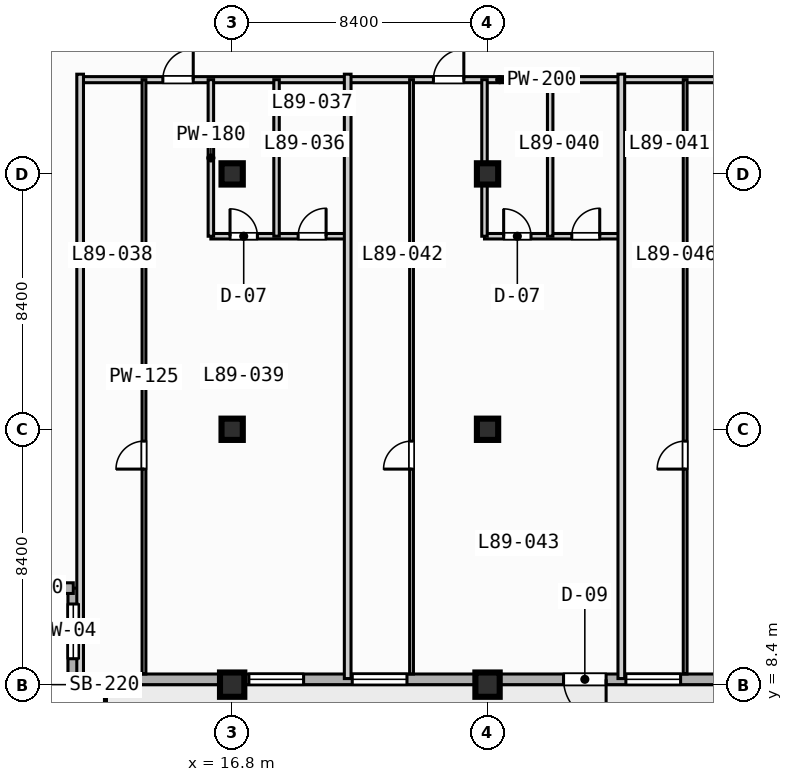
"""IFC4 building model, lengths in metres.
Left out: names, types, materials, properties, quantities, classifications, styles, units other than length and angle.
Written with IfcOpenShell. Run it as: python <this file> out.ifc"""

import sys

from ifc_helpers import new_model, si_unit, direction, frame, frame_2d, origin, origin_2d, place, context, subcontext, project, spatial, rectangle, extrude, element, fill, save


model = new_model("IFC4")
c1 = context("Model", 3, precision=1e-05, world=origin(), true_north=direction((0.0, 1.0)))
c2 = subcontext(c1, "Body", "Model", "MODEL_VIEW")
j1 = project(units=[si_unit("LENGTHUNIT", "METRE"), si_unit("PLANEANGLEUNIT", "RADIAN")], contexts=[c1])
p1 = place(None, origin())
s1 = spatial("IfcSite", under=j1, at=p1, CompositionType="ELEMENT")
p2 = place(p1, origin())
s2 = spatial("IfcBuilding", under=s1, at=p2, CompositionType="ELEMENT")
p3 = place(p2, frame((0.0, 0.0, 359.6)))
s3 = spatial("IfcBuildingStorey", under=s2, at=p3, CompositionType="ELEMENT", Elevation=359.6)
p4 = place(p3, frame((16.8, 8.4, 0.0), z_axis=(0.0, 0.0, 1.0), x_axis=(1.0, 0.0, 0.0)))
e1 = element("IfcColumn", 1, at=p4, inside=s3, PredefinedType="COLUMN", context=c2, shape_type="SweptSolid", body=[
    extrude(rectangle(XDim=0.8, YDim=0.8, at=origin_2d()), origin(), (0.0, 0.0, 1.0), 4.2),
])
for number, where, z_axis, x_axis in (
    (2, (16.8, 16.8, 0.0), (0.0, 0.0, 1.0), (1.0, 0.0, 0.0)),
    (3, (16.8, 25.2, 0.0), (0.0, 0.0, 1.0), (1.0, 0.0, 0.0)),
):
    element("IfcColumn", number, at=place(p3, frame(where, z_axis=z_axis, x_axis=x_axis)), inside=s3, PredefinedType="COLUMN", context=c2, shape_type="SweptSolid", body=[
        extrude(rectangle(XDim=0.7, YDim=0.7, at=origin_2d()), origin(), (0.0, 0.0, 1.0), 4.2),
    ])
p5 = place(p3, frame((25.2, 8.4, 0.0), z_axis=(0.0, 0.0, 1.0), x_axis=(1.0, 0.0, 0.0)))
e4 = element("IfcColumn", 4, at=p5, inside=s3, PredefinedType="COLUMN", context=c2, shape_type="SweptSolid", body=[
    extrude(rectangle(XDim=0.8, YDim=0.8, at=origin_2d()), origin(), (0.0, 0.0, 1.0), 4.2),
])
for number, where, z_axis, x_axis in (
    (5, (25.2, 16.8, 0.0), (0.0, 0.0, 1.0), (1.0, 0.0, 0.0)),
    (6, (25.2, 25.2, 0.0), (0.0, 0.0, 1.0), (1.0, 0.0, 0.0)),
):
    element("IfcColumn", number, at=place(p3, frame(where, z_axis=z_axis, x_axis=x_axis)), inside=s3, PredefinedType="COLUMN", context=c2, shape_type="SweptSolid", body=[
        extrude(rectangle(XDim=0.7, YDim=0.7, at=origin_2d()), origin(), (0.0, 0.0, 1.0), 4.2),
    ])
p6 = place(p3, frame((11.575, 8.575, 0.0), z_axis=(0.0, 0.0, 1.0), x_axis=(0.0, 1.0, 0.0)))
e7 = element("IfcWall", 7, at=p6, inside=s3, PredefinedType="STANDARD", context=c2, shape_type="SweptSolid", body=[
    extrude(rectangle(XDim=3.0, YDim=0.35, at=frame_2d((1.5, 0.0))), origin(), (0.0, 0.0, 1.0), 3.9),
])
p7 = place(p6, frame((0.677, 0.0, 0.85)))
e8 = element("IfcOpeningElement", 8, at=p7, cuts=e7, PredefinedType="OPENING", context=c2, shape_type="SweptSolid", body=[
    extrude(rectangle(XDim=1.8, YDim=1.8, at=frame_2d((0.9, 0.9))), frame((0.0, 0.185, 0.0), z_axis=(0.0, -1.0, 0.0), x_axis=(1.0, 0.0, 0.0)), (0.0, 0.0, 1.0), 0.37),
])
p8 = place(p3, frame((11.575, 11.575, 0.0), z_axis=(0.0, 0.0, 1.0), x_axis=(-1.0, 0.0, 0.0)))
e9 = element("IfcWall", 9, at=p8, inside=s3, PredefinedType="STANDARD", context=c2, shape_type="SweptSolid", body=[
    extrude(rectangle(XDim=3.0, YDim=0.35, at=frame_2d((1.5, 0.0))), origin(), (0.0, 0.0, 1.0), 3.9),
])
p9 = place(p3, frame((64.025, 8.575, 0.0), z_axis=(0.0, 0.0, 1.0), x_axis=(-1.0, 0.0, 0.0)))
e10 = element("IfcWall", 10, at=p9, inside=s3, PredefinedType="STANDARD", context=c2, shape_type="SweptSolid", body=[
    extrude(rectangle(XDim=52.45, YDim=0.35, at=frame_2d((26.225, 0.0))), origin(), (0.0, 0.0, 1.0), 3.045),
])
p10 = place(p9, frame((34.925, 0.0, 0.0)))
e11 = element("IfcOpeningElement", 11, at=p10, cuts=e10, PredefinedType="OPENING", context=c2, shape_type="SweptSolid", body=[
    extrude(rectangle(XDim=1.4, YDim=2.2, at=frame_2d((0.7, 1.1))), frame((0.0, 0.185, 0.0), z_axis=(0.0, -1.0, 0.0), x_axis=(1.0, 0.0, 0.0)), (0.0, 0.0, 1.0), 0.37),
])
p11 = place(p9, frame((24.825, 0.0, 0.45)))
e12 = element("IfcOpeningElement", 12, at=p11, cuts=e10, PredefinedType="OPENING", context=c2, shape_type="SweptSolid", body=[
    extrude(rectangle(XDim=2.8, YDim=2.1, at=frame_2d((1.4, 1.05))), frame((0.0, 0.185, 0.0), z_axis=(0.0, -1.0, 0.0), x_axis=(1.0, 0.0, 0.0)), (0.0, 0.0, 1.0), 0.37),
])
p12 = place(p9, frame((16.425, 0.0, 0.45)))
e13 = element("IfcOpeningElement", 13, at=p12, cuts=e10, PredefinedType="OPENING", context=c2, shape_type="SweptSolid", body=[
    extrude(rectangle(XDim=2.8, YDim=2.1, at=frame_2d((1.4, 1.05))), frame((0.0, 0.185, 0.0), z_axis=(0.0, -1.0, 0.0), x_axis=(1.0, 0.0, 0.0)), (0.0, 0.0, 1.0), 0.37),
])
p13 = place(p9, frame((50.275, 0.0, 0.85)))
e14 = element("IfcOpeningElement", 14, at=p13, cuts=e10, PredefinedType="OPENING", context=c2, shape_type="SweptSolid", body=[
    extrude(rectangle(XDim=1.8, YDim=1.8, at=frame_2d((0.9, 0.9))), frame((0.0, 0.185, 0.0), z_axis=(0.0, -1.0, 0.0), x_axis=(1.0, 0.0, 0.0)), (0.0, 0.0, 1.0), 0.37),
])
p14 = place(p9, frame((44.875, 0.0, 0.85)))
e15 = element("IfcOpeningElement", 15, at=p14, cuts=e10, PredefinedType="OPENING", context=c2, shape_type="SweptSolid", body=[
    extrude(rectangle(XDim=1.8, YDim=1.8, at=frame_2d((0.9, 0.9))), frame((0.0, 0.185, 0.0), z_axis=(0.0, -1.0, 0.0), x_axis=(1.0, 0.0, 0.0)), (0.0, 0.0, 1.0), 0.37),
])
p15 = place(p9, frame((41.475, 0.0, 0.85)))
e16 = element("IfcOpeningElement", 16, at=p15, cuts=e10, PredefinedType="OPENING", context=c2, shape_type="SweptSolid", body=[
    extrude(rectangle(XDim=1.8, YDim=1.8, at=frame_2d((0.9, 0.9))), frame((0.0, 0.185, 0.0), z_axis=(0.0, -1.0, 0.0), x_axis=(1.0, 0.0, 0.0)), (0.0, 0.0, 1.0), 0.37),
])
p16 = place(p9, frame((32.475, 0.0, 0.85)))
e17 = element("IfcOpeningElement", 17, at=p16, cuts=e10, PredefinedType="OPENING", context=c2, shape_type="SweptSolid", body=[
    extrude(rectangle(XDim=1.8, YDim=1.8, at=frame_2d((0.9, 0.9))), frame((0.0, 0.185, 0.0), z_axis=(0.0, -1.0, 0.0), x_axis=(1.0, 0.0, 0.0)), (0.0, 0.0, 1.0), 0.37),
])
p17 = place(p3, frame((11.8, 28.3, 0.0), z_axis=(0.0, 0.0, 1.0), x_axis=(1.0, 0.0, 0.0)))
e18 = element("IfcWall", 18, at=p17, inside=s3, PredefinedType="PARTITIONING", context=c2, shape_type="SweptSolid", body=[
    extrude(rectangle(XDim=27.6, YDim=0.2, at=frame_2d((13.8, 0.0))), origin(), (0.0, 0.0, 1.0), 3.9),
])
p18 = place(p17, frame((2.72, 0.0, 0.0)))
e19 = element("IfcOpeningElement", 19, at=p18, cuts=e18, PredefinedType="OPENING", context=c2, shape_type="SweptSolid", body=[
    extrude(rectangle(XDim=1.0, YDim=2.15, at=frame_2d((0.5, 1.075))), frame((0.0, 0.11, 0.0), z_axis=(0.0, -1.0, 0.0), x_axis=(1.0, 0.0, 0.0)), (0.0, 0.0, 1.0), 0.22),
])
p19 = place(p17, frame((11.62, 0.0, 0.0)))
e20 = element("IfcOpeningElement", 20, at=p19, cuts=e18, PredefinedType="OPENING", context=c2, shape_type="SweptSolid", body=[
    extrude(rectangle(XDim=1.0, YDim=2.15, at=frame_2d((0.5, 1.075))), frame((0.0, 0.11, 0.0), z_axis=(0.0, -1.0, 0.0), x_axis=(1.0, 0.0, 0.0)), (0.0, 0.0, 1.0), 0.22),
])
p20 = place(p17, frame((21.02, 0.0, 0.0)))
e21 = element("IfcOpeningElement", 21, at=p20, cuts=e18, PredefinedType="OPENING", context=c2, shape_type="SweptSolid", body=[
    extrude(rectangle(XDim=1.0, YDim=2.15, at=frame_2d((0.5, 1.075))), frame((0.0, 0.11, 0.0), z_axis=(0.0, -1.0, 0.0), x_axis=(1.0, 0.0, 0.0)), (0.0, 0.0, 1.0), 0.22),
])
p21 = place(p3, frame((11.8, 8.6, 0.0), z_axis=(0.0, 0.0, 1.0), x_axis=(0.0, 1.0, 0.0)))
e22 = element("IfcWall", 22, at=p21, inside=s3, PredefinedType="PARTITIONING", context=c2, shape_type="SweptSolid", body=[
    extrude(rectangle(XDim=19.88, YDim=0.22, at=frame_2d((9.94, 0.0))), origin(), (0.0, 0.0, 1.0), 3.9),
])
p22 = place(p3, frame((16.1, 23.15, 0.0), z_axis=(0.0, 0.0, 1.0), x_axis=(1.0, 0.0, 0.0)))
e23 = element("IfcWall", 23, at=p22, inside=s3, PredefinedType="PLUMBINGWALL", context=c2, shape_type="SweptSolid", body=[
    extrude(rectangle(XDim=4.5, YDim=0.18, at=frame_2d((2.25, 0.0))), origin(), (0.0, 0.0, 1.0), 3.9),
])
p23 = place(p22, frame((0.63, 0.0, 0.0)))
e24 = element("IfcOpeningElement", 24, at=p23, cuts=e23, PredefinedType="OPENING", context=c2, shape_type="SweptSolid", body=[
    extrude(rectangle(XDim=0.9, YDim=2.1, at=frame_2d((0.45, 1.05))), frame((0.0, 0.1, 0.0), z_axis=(0.0, -1.0, 0.0), x_axis=(1.0, 0.0, 0.0)), (0.0, 0.0, 1.0), 0.2),
])
p24 = place(p22, frame((2.87, 0.0, 0.0)))
e25 = element("IfcOpeningElement", 25, at=p24, cuts=e23, PredefinedType="OPENING", context=c2, shape_type="SweptSolid", body=[
    extrude(rectangle(XDim=0.92, YDim=2.1, at=frame_2d((0.46, 1.05))), frame((0.0, 0.1, 0.0), z_axis=(0.0, -1.0, 0.0), x_axis=(1.0, 0.0, 0.0)), (0.0, 0.0, 1.0), 0.2),
])
for number, where, z_axis, x_axis in (
    (26, (16.1, 23.15, 0.0), (0.0, 0.0, 1.0), (0.0, 1.0, 0.0)),
    (27, (18.26, 23.15, 0.0), (0.0, 0.0, 1.0), (0.0, 1.0, 0.0)),
):
    element("IfcWall", number, at=place(p3, frame(where, z_axis=z_axis, x_axis=x_axis)), inside=s3, PredefinedType="PLUMBINGWALL", context=c2, shape_type="SweptSolid", body=[
        extrude(rectangle(XDim=5.15, YDim=0.18, at=frame_2d((2.575, 0.0))), origin(), (0.0, 0.0, 1.0), 3.9),
    ])
p25 = place(p3, frame((13.9, 8.75, 0.0), z_axis=(0.0, 0.0, 1.0), x_axis=(0.0, 1.0, 0.0)))
e28 = element("IfcWall", 28, at=p25, inside=s3, PredefinedType="PARTITIONING", context=c2, shape_type="SweptSolid", body=[
    extrude(rectangle(XDim=19.55, YDim=0.125, at=frame_2d((9.775, 0.0))), origin(), (0.0, 0.0, 1.0), 3.9),
])
p26 = place(p25, frame((6.74, 0.0, 0.0)))
e29 = element("IfcOpeningElement", 29, at=p26, cuts=e28, PredefinedType="OPENING", context=c2, shape_type="SweptSolid", body=[
    extrude(rectangle(XDim=0.92, YDim=2.1, at=frame_2d((0.46, 1.05))), frame((0.0, 0.073, 0.0), z_axis=(0.0, -1.0, 0.0), x_axis=(1.0, 0.0, 0.0)), (0.0, 0.0, 1.0), 0.145),
])
p27 = place(p3, frame((20.6, 8.6, 0.0), z_axis=(0.0, 0.0, 1.0), x_axis=(0.0, 1.0, 0.0)))
e30 = element("IfcWall", 30, at=p27, inside=s3, PredefinedType="PARTITIONING", context=c2, shape_type="SweptSolid", body=[
    extrude(rectangle(XDim=19.88, YDim=0.22, at=frame_2d((9.94, 0.0))), origin(), (0.0, 0.0, 1.0), 3.9),
])
p28 = place(p3, frame((25.1, 23.15, 0.0), z_axis=(0.0, 0.0, 1.0), x_axis=(1.0, 0.0, 0.0)))
e31 = element("IfcWall", 31, at=p28, inside=s3, PredefinedType="PLUMBINGWALL", context=c2, shape_type="SweptSolid", body=[
    extrude(rectangle(XDim=4.5, YDim=0.18, at=frame_2d((2.25, 0.0))), origin(), (0.0, 0.0, 1.0), 3.9),
])
p29 = place(p28, frame((0.63, 0.0, 0.0)))
e32 = element("IfcOpeningElement", 32, at=p29, cuts=e31, PredefinedType="OPENING", context=c2, shape_type="SweptSolid", body=[
    extrude(rectangle(XDim=0.9, YDim=2.1, at=frame_2d((0.45, 1.05))), frame((0.0, 0.1, 0.0), z_axis=(0.0, -1.0, 0.0), x_axis=(1.0, 0.0, 0.0)), (0.0, 0.0, 1.0), 0.2),
])
p30 = place(p28, frame((2.87, 0.0, 0.0)))
e33 = element("IfcOpeningElement", 33, at=p30, cuts=e31, PredefinedType="OPENING", context=c2, shape_type="SweptSolid", body=[
    extrude(rectangle(XDim=0.92, YDim=2.1, at=frame_2d((0.46, 1.05))), frame((0.0, 0.1, 0.0), z_axis=(0.0, -1.0, 0.0), x_axis=(1.0, 0.0, 0.0)), (0.0, 0.0, 1.0), 0.2),
])
p31 = place(p3, frame((25.1, 23.15, 0.0), z_axis=(0.0, 0.0, 1.0), x_axis=(0.0, 1.0, 0.0)))
e34 = element("IfcWall", 34, at=p31, inside=s3, PredefinedType="PLUMBINGWALL", context=c2, shape_type="SweptSolid", body=[
    extrude(rectangle(XDim=5.15, YDim=0.18, at=frame_2d((2.575, 0.0))), origin(), (0.0, 0.0, 1.0), 3.3),
])
p32 = place(p3, frame((27.26, 23.15, 0.0), z_axis=(0.0, 0.0, 1.0), x_axis=(0.0, 1.0, 0.0)))
e35 = element("IfcWall", 35, at=p32, inside=s3, PredefinedType="PLUMBINGWALL", context=c2, shape_type="SweptSolid", body=[
    extrude(rectangle(XDim=5.15, YDim=0.18, at=frame_2d((2.575, 0.0))), origin(), (0.0, 0.0, 1.0), 3.9),
])
p33 = place(p3, frame((22.7, 8.75, 0.0), z_axis=(0.0, 0.0, 1.0), x_axis=(0.0, 1.0, 0.0)))
e36 = element("IfcWall", 36, at=p33, inside=s3, PredefinedType="PARTITIONING", context=c2, shape_type="SweptSolid", body=[
    extrude(rectangle(XDim=19.55, YDim=0.125, at=frame_2d((9.775, 0.0))), origin(), (0.0, 0.0, 1.0), 3.9),
])
p34 = place(p33, frame((6.74, 0.0, 0.0)))
e37 = element("IfcOpeningElement", 37, at=p34, cuts=e36, PredefinedType="OPENING", context=c2, shape_type="SweptSolid", body=[
    extrude(rectangle(XDim=0.92, YDim=2.1, at=frame_2d((0.46, 1.05))), frame((0.0, 0.073, 0.0), z_axis=(0.0, -1.0, 0.0), x_axis=(1.0, 0.0, 0.0)), (0.0, 0.0, 1.0), 0.145),
])
p35 = place(p3, frame((29.6, 8.6, 0.0), z_axis=(0.0, 0.0, 1.0), x_axis=(0.0, 1.0, 0.0)))
e38 = element("IfcWall", 38, at=p35, inside=s3, PredefinedType="PARTITIONING", context=c2, shape_type="SweptSolid", body=[
    extrude(rectangle(XDim=19.88, YDim=0.22, at=frame_2d((9.94, 0.0))), origin(), (0.0, 0.0, 1.0), 3.546),
])
p36 = place(p3, frame((31.7, 8.75, 0.0), z_axis=(0.0, 0.0, 1.0), x_axis=(0.0, 1.0, 0.0)))
e39 = element("IfcWall", 39, at=p36, inside=s3, PredefinedType="PARTITIONING", context=c2, shape_type="SweptSolid", body=[
    extrude(rectangle(XDim=19.55, YDim=0.125, at=frame_2d((9.775, 0.0))), origin(), (0.0, 0.0, 1.0), 3.9),
])
p37 = place(p36, frame((6.74, 0.0, 0.0)))
e40 = element("IfcOpeningElement", 40, at=p37, cuts=e39, PredefinedType="OPENING", context=c2, shape_type="SweptSolid", body=[
    extrude(rectangle(XDim=0.92, YDim=2.1, at=frame_2d((0.46, 1.05))), frame((0.0, 0.073, 0.0), z_axis=(0.0, -1.0, 0.0), x_axis=(1.0, 0.0, 0.0)), (0.0, 0.0, 1.0), 0.145),
])
p38 = place(p7, origin())
e41 = element("IfcWindow", 41, at=p38, inside=s3, PartitioningType="SINGLE_PANEL", PredefinedType="WINDOW", context=c2, shape_type="SweptSolid", body=[
    extrude(rectangle(XDim=1.8, YDim=1.8, at=frame_2d((0.9, 0.9))), frame((0.0, 0.03, 0.0), z_axis=(0.0, -1.0, 0.0), x_axis=(1.0, 0.0, 0.0)), (0.0, 0.0, 1.0), 0.06),
])
fill(e8, e41)
p39 = place(p10, origin())
e42 = element("IfcDoor", 42, at=p39, inside=s3, OperationType="SINGLE_SWING_LEFT", PredefinedType="DOOR", context=c2, shape_type="SweptSolid", body=[
    extrude(rectangle(XDim=1.4, YDim=2.2, at=frame_2d((0.7, 1.1))), frame((0.0, 0.025, 0.0), z_axis=(0.0, -1.0, 0.0), x_axis=(1.0, 0.0, 0.0)), (0.0, 0.0, 1.0), 0.05),
])
fill(e11, e42)
p40 = place(p13, origin())
e43 = element("IfcWindow", 43, at=p40, inside=s3, PartitioningType="SINGLE_PANEL", PredefinedType="WINDOW", context=c2, shape_type="SweptSolid", body=[
    extrude(rectangle(XDim=1.8, YDim=1.8, at=frame_2d((0.9, 0.9))), frame((0.0, 0.03, 0.0), z_axis=(0.0, -1.0, 0.0), x_axis=(1.0, 0.0, 0.0)), (0.0, 0.0, 1.0), 0.06),
])
fill(e14, e43)
p41 = place(p14, origin())
e44 = element("IfcWindow", 44, at=p41, inside=s3, PartitioningType="SINGLE_PANEL", PredefinedType="WINDOW", context=c2, shape_type="SweptSolid", body=[
    extrude(rectangle(XDim=1.8, YDim=1.8, at=frame_2d((0.9, 0.9))), frame((0.0, 0.03, 0.0), z_axis=(0.0, -1.0, 0.0), x_axis=(1.0, 0.0, 0.0)), (0.0, 0.0, 1.0), 0.06),
])
fill(e15, e44)
p42 = place(p15, origin())
e45 = element("IfcWindow", 45, at=p42, inside=s3, PartitioningType="SINGLE_PANEL", PredefinedType="WINDOW", context=c2, shape_type="SweptSolid", body=[
    extrude(rectangle(XDim=1.8, YDim=1.8, at=frame_2d((0.9, 0.9))), frame((0.0, 0.03, 0.0), z_axis=(0.0, -1.0, 0.0), x_axis=(1.0, 0.0, 0.0)), (0.0, 0.0, 1.0), 0.06),
])
fill(e16, e45)
p43 = place(p16, origin())
e46 = element("IfcWindow", 46, at=p43, inside=s3, PartitioningType="SINGLE_PANEL", PredefinedType="WINDOW", context=c2, shape_type="SweptSolid", body=[
    extrude(rectangle(XDim=1.8, YDim=1.8, at=frame_2d((0.9, 0.9))), frame((0.0, 0.03, 0.0), z_axis=(0.0, -1.0, 0.0), x_axis=(1.0, 0.0, 0.0)), (0.0, 0.0, 1.0), 0.06),
])
fill(e17, e46)
p44 = place(p18, origin())
e47 = element("IfcDoor", 47, at=p44, inside=s3, OperationType="SINGLE_SWING_RIGHT", PredefinedType="DOOR", context=c2, shape_type="SweptSolid", body=[
    extrude(rectangle(XDim=1.0, YDim=2.15, at=frame_2d((0.5, 1.075))), frame((0.0, 0.025, 0.0), z_axis=(0.0, -1.0, 0.0), x_axis=(1.0, 0.0, 0.0)), (0.0, 0.0, 1.0), 0.05),
])
fill(e19, e47)
p45 = place(p19, origin())
e48 = element("IfcDoor", 48, at=p45, inside=s3, OperationType="SINGLE_SWING_RIGHT", PredefinedType="DOOR", context=c2, shape_type="SweptSolid", body=[
    extrude(rectangle(XDim=1.0, YDim=2.15, at=frame_2d((0.5, 1.075))), frame((0.0, 0.025, 0.0), z_axis=(0.0, -1.0, 0.0), x_axis=(1.0, 0.0, 0.0)), (0.0, 0.0, 1.0), 0.05),
])
fill(e20, e48)
p46 = place(p23, origin())
e49 = element("IfcDoor", 49, at=p46, inside=s3, OperationType="SINGLE_SWING_LEFT", PredefinedType="DOOR", context=c2, shape_type="SweptSolid", body=[
    extrude(rectangle(XDim=0.9, YDim=2.1, at=frame_2d((0.45, 1.05))), frame((0.0, 0.025, 0.0), z_axis=(0.0, -1.0, 0.0), x_axis=(1.0, 0.0, 0.0)), (0.0, 0.0, 1.0), 0.05),
])
fill(e24, e49)
p47 = place(p24, origin())
e50 = element("IfcDoor", 50, at=p47, inside=s3, OperationType="SINGLE_SWING_RIGHT", PredefinedType="DOOR", context=c2, shape_type="SweptSolid", body=[
    extrude(rectangle(XDim=0.92, YDim=2.1, at=frame_2d((0.46, 1.05))), frame((0.0, 0.025, 0.0), z_axis=(0.0, -1.0, 0.0), x_axis=(1.0, 0.0, 0.0)), (0.0, 0.0, 1.0), 0.05),
])
fill(e25, e50)
p48 = place(p26, origin())
e51 = element("IfcDoor", 51, at=p48, inside=s3, OperationType="SINGLE_SWING_LEFT", PredefinedType="DOOR", context=c2, shape_type="SweptSolid", body=[
    extrude(rectangle(XDim=0.92, YDim=2.1, at=frame_2d((0.46, 1.05))), frame((0.0, 0.025, 0.0), z_axis=(0.0, -1.0, 0.0), x_axis=(1.0, 0.0, 0.0)), (0.0, 0.0, 1.0), 0.05),
])
fill(e29, e51)
p49 = place(p29, origin())
e52 = element("IfcDoor", 52, at=p49, inside=s3, OperationType="SINGLE_SWING_LEFT", PredefinedType="DOOR", context=c2, shape_type="SweptSolid", body=[
    extrude(rectangle(XDim=0.9, YDim=2.1, at=frame_2d((0.45, 1.05))), frame((0.0, 0.025, 0.0), z_axis=(0.0, -1.0, 0.0), x_axis=(1.0, 0.0, 0.0)), (0.0, 0.0, 1.0), 0.05),
])
fill(e32, e52)
p50 = place(p30, origin())
e53 = element("IfcDoor", 53, at=p50, inside=s3, OperationType="SINGLE_SWING_RIGHT", PredefinedType="DOOR", context=c2, shape_type="SweptSolid", body=[
    extrude(rectangle(XDim=0.92, YDim=2.1, at=frame_2d((0.46, 1.05))), frame((0.0, 0.025, 0.0), z_axis=(0.0, -1.0, 0.0), x_axis=(1.0, 0.0, 0.0)), (0.0, 0.0, 1.0), 0.05),
])
fill(e33, e53)
p51 = place(p34, origin())
e54 = element("IfcDoor", 54, at=p51, inside=s3, OperationType="SINGLE_SWING_LEFT", PredefinedType="DOOR", context=c2, shape_type="SweptSolid", body=[
    extrude(rectangle(XDim=0.92, YDim=2.1, at=frame_2d((0.46, 1.05))), frame((0.0, 0.025, 0.0), z_axis=(0.0, -1.0, 0.0), x_axis=(1.0, 0.0, 0.0)), (0.0, 0.0, 1.0), 0.05),
])
fill(e37, e54)
p52 = place(p37, origin())
e55 = element("IfcDoor", 55, at=p52, inside=s3, OperationType="SINGLE_SWING_LEFT", PredefinedType="DOOR", context=c2, shape_type="SweptSolid", body=[
    extrude(rectangle(XDim=0.92, YDim=2.1, at=frame_2d((0.46, 1.05))), frame((0.0, 0.025, 0.0), z_axis=(0.0, -1.0, 0.0), x_axis=(1.0, 0.0, 0.0)), (0.0, 0.0, 1.0), 0.05),
])
fill(e40, e55)
save(model, sys.argv[1])
